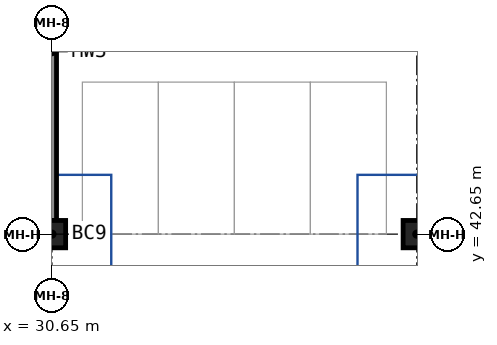
"""IFC4 building model, lengths in metres.
Left out: names, types, materials, properties, quantities, classifications, styles, units other than length and angle.
Written with IfcOpenShell. Run it as: python <this file> out.ifc"""

import sys

from ifc_helpers import new_model, si_unit, direction, frame, frame_2d, origin, origin_2d, place, context, subcontext, project, spatial, rectangle, extrude, source, transform, mapped, element, save


model = new_model("IFC4")
c1 = context("Model", 3, precision=1e-05, world=origin(), true_north=direction((0.0, 1.0)))
c2 = subcontext(c1, "Body", "Model", "MODEL_VIEW")
j1 = project(units=[si_unit("LENGTHUNIT", "METRE"), si_unit("PLANEANGLEUNIT", "RADIAN")], contexts=[c1])
p1 = place(None, origin())
s1 = spatial("IfcSite", under=j1, at=p1, CompositionType="ELEMENT")
p2 = place(p1, origin())
s2 = spatial("IfcBuilding", under=s1, at=p2, CompositionType="ELEMENT")
p3 = place(p2, frame((0.0, 0.0, -9.0)))
s3 = spatial("IfcBuildingStorey", under=s2, at=p3, CompositionType="ELEMENT", Elevation=-9.0)
m1 = source(origin(), c2, "Body", "SweptSolid", [
    extrude(rectangle(XDim=11.1, YDim=0.3, at=frame_2d((5.55, 0.0))), origin(), (0.0, 0.0, 1.0), 4.1),
])
p4 = place(p3, frame((30.65, 54.2, 0.0), z_axis=(0.0, 0.0, 1.0), x_axis=(0.0, -1.0, 0.0)))
e1 = element("IfcWall", 1, at=p4, inside=s3, PredefinedType="SHEAR", context=c2, shape_type="MappedRepresentation", body=[
    mapped(m1, transform((0.0, 0.0, 0.0))),
])
m2 = source(origin(), c2, "Body", "SweptSolid", [
    extrude(rectangle(XDim=0.9, YDim=0.9, at=origin_2d()), origin(), (0.0, 0.0, 1.0), 4.5),
])
for number, where, z_axis, x_axis in (
    (2, (30.65, 42.65, 0.0), (0.0, 0.0, 1.0), (1.0, 0.0, 0.0)),
    (3, (42.65, 42.65, 0.0), (0.0, 0.0, 1.0), (1.0, 0.0, 0.0)),
):
    element("IfcColumn", number, at=place(p3, frame(where, z_axis=z_axis, x_axis=x_axis)), inside=s3, PredefinedType="COLUMN", context=c2, shape_type="MappedRepresentation", body=[
        mapped(m2, transform((0.0, 0.0, 0.0))),
    ])
save(model, sys.argv[1])
